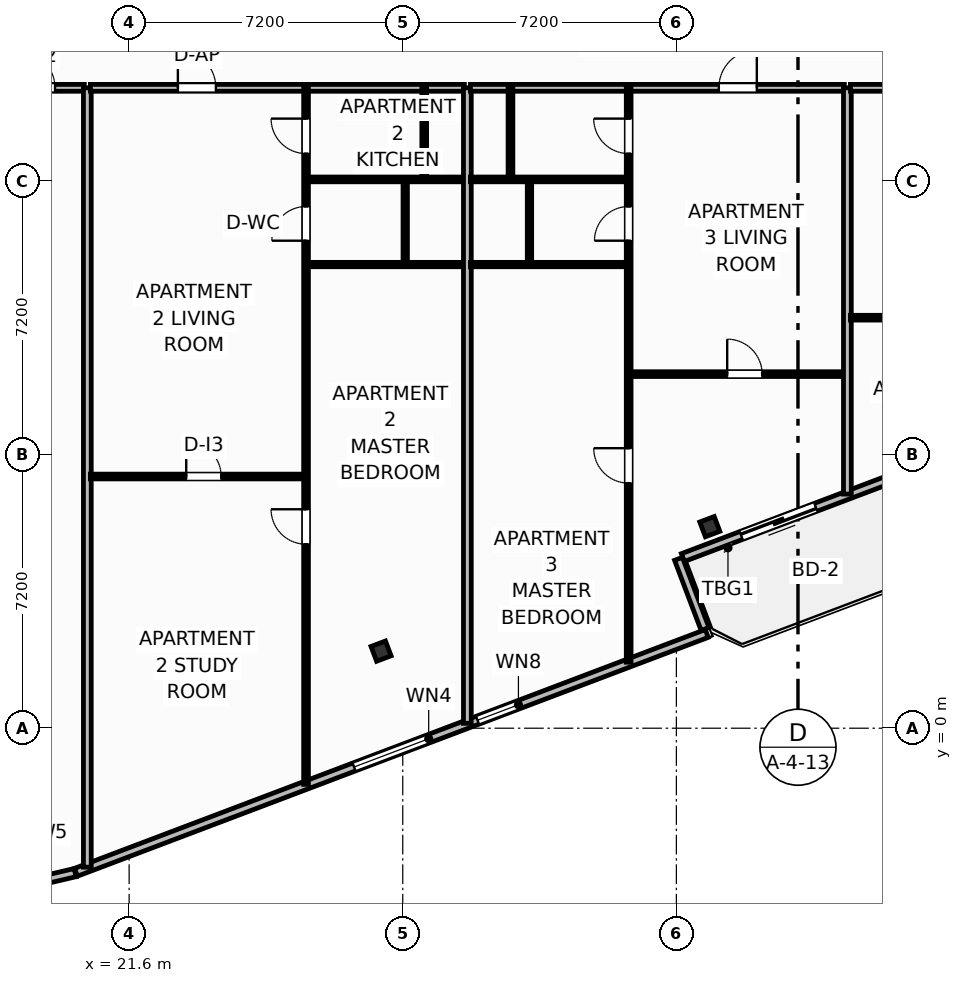
"""IFC4 building model, lengths in metres.
Left out: names, types, materials, properties, quantities, classifications, styles, units other than length and angle.
Written with IfcOpenShell. Run it as: python <this file> out.ifc"""

import sys

from ifc_helpers import new_model, si_unit, direction, frame, frame_2d, origin, origin_2d, place, context, subcontext, project, spatial, rectangle, i_section, extrude, element, fill, save


model = new_model("IFC4")
c1 = context("Model", 3, precision=1e-05, world=origin(), true_north=direction((0.0, 1.0)))
c2 = subcontext(c1, "Body", "Model", "MODEL_VIEW")
j1 = project(units=[si_unit("LENGTHUNIT", "METRE"), si_unit("PLANEANGLEUNIT", "RADIAN")], contexts=[c1])
p1 = place(None, origin())
s1 = spatial("IfcSite", under=j1, at=p1, CompositionType="ELEMENT")
p2 = place(p1, origin())
s2 = spatial("IfcBuilding", under=s1, at=p2, CompositionType="ELEMENT")
p3 = place(p2, frame((0.0, 0.0, 212.7)))
s3 = spatial("IfcBuildingStorey", under=s2, at=p3, CompositionType="ELEMENT", Elevation=212.7)
for number, where, z_axis, x_axis in (
    (1, (28.229, 2.028, 0.0), (0.0, 0.0, 1.0), (0.935, 0.354, 0.0)),
    (2, (36.88, 5.303, 0.0), (0.0, 0.0, 1.0), (0.935, 0.354, 0.0)),
):
    element("IfcColumn", number, at=place(p3, frame(where, z_axis=z_axis, x_axis=x_axis)), inside=s3, PredefinedType="COLUMN", context=c2, shape_type="SweptSolid", body=[
        extrude(i_section(OverallWidth=0.406, OverallDepth=0.416, WebThickness=0.03, FlangeThickness=0.048, FilletRadius=0.025, at=origin_2d()), origin(), (0.0, 0.0, 1.0), 3.7),
    ])
p4 = place(p3, frame((41.783, 6.614, 0.0), z_axis=(0.0, 0.0, 1.0), x_axis=(-0.93521416643, -0.354082565101, 0.0)))
e3 = element("IfcWall", 3, at=p4, inside=s3, PredefinedType="SOLIDWALL", context=c2, shape_type="SweptSolid", body=[
    extrude(rectangle(XDim=6.0, YDim=0.22, at=frame_2d((3.0, 0.0))), origin(), (0.0, 0.0, 1.0), 2.73),
])
p5 = place(p4, frame((2.26, 0.0, 0.0)))
e4 = element("IfcOpeningElement", 4, at=p5, cuts=e3, PredefinedType="OPENING", context=c2, shape_type="SweptSolid", body=[
    extrude(rectangle(XDim=2.1, YDim=2.3, at=frame_2d((1.05, 1.15))), frame((0.0, 0.12, 0.0), z_axis=(0.0, -1.0, 0.0), x_axis=(1.0, 0.0, 0.0)), (0.0, 0.0, 1.0), 0.24),
])
p6 = place(p3, frame((18.956, -4.087, 0.0), z_axis=(0.0, 0.0, 1.0), x_axis=(0.973463008152, 0.228844426981, 0.0)))
e5 = element("IfcWall", 5, at=p6, inside=s3, PredefinedType="SOLIDWALL", context=c2, shape_type="SweptSolid", body=[
    extrude(rectangle(XDim=1.257, YDim=0.22, at=frame_2d((0.628, 0.0))), origin(), (0.0, 0.0, 1.0), 2.73),
])
p7 = place(p3, frame((20.202, -3.791, 0.0), z_axis=(0.0, 0.0, 1.0), x_axis=(0.935225574232, 0.354052432984, 0.0)))
e6 = element("IfcWall", 6, at=p7, inside=s3, PredefinedType="SOLIDWALL", context=c2, shape_type="SweptSolid", body=[
    extrude(rectangle(XDim=17.747, YDim=0.22, at=frame_2d((8.874, 0.0))), origin(), (0.0, 0.0, 1.0), 2.73),
])
p8 = place(p7, frame((7.823, 0.0, 0.8)))
e7 = element("IfcOpeningElement", 7, at=p8, cuts=e6, PredefinedType="OPENING", context=c2, shape_type="SweptSolid", body=[
    extrude(rectangle(XDim=2.1, YDim=1.75, at=frame_2d((1.05, 0.875))), frame((0.0, 0.12, 0.0), z_axis=(0.0, -1.0, 0.0), x_axis=(1.0, 0.0, 0.0)), (0.0, 0.0, 1.0), 0.24),
])
p9 = place(p7, frame((11.298, 0.0, 0.8)))
e8 = element("IfcOpeningElement", 8, at=p9, cuts=e6, PredefinedType="OPENING", context=c2, shape_type="SweptSolid", body=[
    extrude(rectangle(XDim=1.15, YDim=1.4, at=frame_2d((0.575, 0.7))), frame((0.0, 0.12, 0.0), z_axis=(0.0, -1.0, 0.0), x_axis=(1.0, 0.0, 0.0)), (0.0, 0.0, 1.0), 0.24),
])
p10 = place(p3, frame((36.755, 2.61, 0.0), z_axis=(0.0, 0.0, 1.0), x_axis=(-0.354020680661, 0.935237594232, 0.0)))
e9 = element("IfcWall", 9, at=p10, inside=s3, PredefinedType="SOLIDWALL", context=c2, shape_type="SweptSolid", body=[
    extrude(rectangle(XDim=1.975, YDim=0.22, at=frame_2d((0.988, 0.0))), origin(), (0.0, 0.0, 1.0), 2.73),
])
p11 = place(p3, frame((7.196, 16.85, 0.0), z_axis=(0.0, 0.0, 1.0), x_axis=(1.0, 0.0, 0.0)))
e10 = element("IfcWall", 10, at=p11, inside=s3, PredefinedType="PARTITIONING", context=c2, shape_type="SweptSolid", body=[
    extrude(rectangle(XDim=13.224, YDim=0.18, at=frame_2d((6.612, 0.0))), origin(), (0.0, 0.0, 1.0), 3.45),
])
p12 = place(p11, frame((11.504, 0.0, 0.0)))
e11 = element("IfcOpeningElement", 11, at=p12, cuts=e10, PredefinedType="OPENING", context=c2, shape_type="SweptSolid", body=[
    extrude(rectangle(XDim=0.95, YDim=2.05, at=frame_2d((0.475, 1.025))), frame((0.0, 0.1, 0.0), z_axis=(0.0, -1.0, 0.0), x_axis=(1.0, 0.0, 0.0)), (0.0, 0.0, 1.0), 0.2),
])
p13 = place(p3, frame((20.5, -3.657, 0.0), z_axis=(0.0, 0.0, 1.0), x_axis=(0.0, 1.0, 0.0)))
e12 = element("IfcWall", 12, at=p13, inside=s3, PredefinedType="PARTITIONING", context=c2, shape_type="SweptSolid", body=[
    extrude(rectangle(XDim=20.507, YDim=0.205, at=frame_2d((10.253, 0.0))), origin(), (0.0, 0.0, 1.0), 3.45),
])
p14 = place(p3, frame((20.58, 6.623, 0.0), z_axis=(0.0, 0.0, 1.0), x_axis=(1.0, 0.0, 0.0)))
e13 = element("IfcWall", 13, at=p14, inside=s3, PredefinedType="PARTITIONING", context=c2, shape_type="SweptSolid", body=[
    extrude(rectangle(XDim=5.605, YDim=0.125, at=frame_2d((2.803, 0.0))), origin(), (0.0, 0.0, 1.0), 3.45),
])
p15 = place(p14, frame((2.522, 0.0, 0.0)))
e14 = element("IfcOpeningElement", 14, at=p15, cuts=e13, PredefinedType="OPENING", context=c2, shape_type="SweptSolid", body=[
    extrude(rectangle(XDim=0.92, YDim=2.05, at=frame_2d((0.46, 1.025))), frame((0.0, 0.073, 0.0), z_axis=(0.0, -1.0, 0.0), x_axis=(1.0, 0.0, 0.0)), (0.0, 0.0, 1.0), 0.145),
])
p16 = place(p3, frame((20.58, 16.85, 0.0), z_axis=(0.0, 0.0, 1.0), x_axis=(1.0, 0.0, 0.0)))
e15 = element("IfcWall", 15, at=p16, inside=s3, PredefinedType="PARTITIONING", context=c2, shape_type="SweptSolid", body=[
    extrude(rectangle(XDim=9.84, YDim=0.18, at=frame_2d((4.92, 0.0))), origin(), (0.0, 0.0, 1.0), 3.45),
])
p17 = place(p16, frame((2.302, 0.0, 0.0)))
e16 = element("IfcOpeningElement", 16, at=p17, cuts=e15, PredefinedType="OPENING", context=c2, shape_type="SweptSolid", body=[
    extrude(rectangle(XDim=1.0, YDim=2.2, at=frame_2d((0.5, 1.1))), frame((0.0, 0.1, 0.0), z_axis=(0.0, -1.0, 0.0), x_axis=(1.0, 0.0, 0.0)), (0.0, 0.0, 1.0), 0.2),
])
p18 = place(p3, frame((26.255, -1.478, 0.0), z_axis=(0.0, 0.0, 1.0), x_axis=(0.0, 1.0, 0.0)))
e17 = element("IfcWall", 17, at=p18, inside=s3, PredefinedType="PARTITIONING", context=c2, shape_type="SweptSolid", body=[
    extrude(rectangle(XDim=18.328, YDim=0.125, at=frame_2d((9.164, 0.0))), origin(), (0.0, 0.0, 1.0), 2.739),
])
p19 = place(p18, frame((6.319, 0.0, 0.0)))
e18 = element("IfcOpeningElement", 18, at=p19, cuts=e17, PredefinedType="OPENING", context=c2, shape_type="SweptSolid", body=[
    extrude(rectangle(XDim=0.92, YDim=2.05, at=frame_2d((0.46, 1.025))), frame((0.0, 0.073, 0.0), z_axis=(0.0, -1.0, 0.0), x_axis=(1.0, 0.0, 0.0)), (0.0, 0.0, 1.0), 0.145),
])
p20 = place(p18, frame((14.305, 0.0, 0.0)))
e19 = element("IfcOpeningElement", 19, at=p20, cuts=e17, PredefinedType="OPENING", context=c2, shape_type="SweptSolid", body=[
    extrude(rectangle(XDim=0.9, YDim=2.05, at=frame_2d((0.45, 1.025))), frame((0.0, 0.073, 0.0), z_axis=(0.0, -1.0, 0.0), x_axis=(1.0, 0.0, 0.0)), (0.0, 0.0, 1.0), 0.145),
])
p21 = place(p18, frame((16.598, 0.0, 0.0)))
e20 = element("IfcOpeningElement", 20, at=p21, cuts=e17, PredefinedType="OPENING", context=c2, shape_type="SweptSolid", body=[
    extrude(rectangle(XDim=0.92, YDim=2.05, at=frame_2d((0.46, 1.025))), frame((0.0, 0.073, 0.0), z_axis=(0.0, -1.0, 0.0), x_axis=(1.0, 0.0, 0.0)), (0.0, 0.0, 1.0), 0.145),
])
p22 = place(p3, frame((26.325, 14.44, 0.0), z_axis=(0.0, 0.0, 1.0), x_axis=(1.0, 0.0, 0.0)))
e21 = element("IfcWall", 21, at=p22, inside=s3, PredefinedType="PARTITIONING", context=c2, shape_type="SweptSolid", body=[
    extrude(rectangle(XDim=4.095, YDim=0.125, at=frame_2d((2.047, 0.0))), origin(), (0.0, 0.0, 1.0), 3.45),
])
p23 = place(p3, frame((26.325, 12.2, 0.0), z_axis=(0.0, 0.0, 1.0), x_axis=(1.0, 0.0, 0.0)))
e22 = element("IfcWall", 22, at=p23, inside=s3, PredefinedType="PARTITIONING", context=c2, shape_type="SweptSolid", body=[
    extrude(rectangle(XDim=4.095, YDim=0.115, at=frame_2d((2.047, 0.0))), origin(), (0.0, 0.0, 1.0), 3.45),
])
p24 = place(p3, frame((29.365, 14.44, 0.0), z_axis=(0.0, 0.0, 1.0), x_axis=(0.0, 1.0, 0.0)))
e23 = element("IfcWall", 23, at=p24, inside=s3, PredefinedType="PARTITIONING", context=c2, shape_type="SweptSolid", body=[
    extrude(rectangle(XDim=2.41, YDim=0.125, at=frame_2d((1.205, 0.0))), origin(), (0.0, 0.0, 1.0), 3.45),
])
p25 = place(p3, frame((28.865, 12.2, 0.0), z_axis=(0.0, 0.0, 1.0), x_axis=(0.0, 1.0, 0.0)))
e24 = element("IfcWall", 24, at=p25, inside=s3, PredefinedType="PARTITIONING", context=c2, shape_type="SweptSolid", body=[
    extrude(rectangle(XDim=2.24, YDim=0.115, at=frame_2d((1.12, 0.0))), origin(), (0.0, 0.0, 1.0), 3.45),
])
p26 = place(p3, frame((30.5, 0.129, 0.0), z_axis=(0.0, 0.0, 1.0), x_axis=(0.0, 1.0, 0.0)))
e25 = element("IfcWall", 25, at=p26, inside=s3, PredefinedType="PARTITIONING", context=c2, shape_type="SweptSolid", body=[
    extrude(rectangle(XDim=16.721, YDim=0.205, at=frame_2d((8.36, 0.0))), origin(), (0.0, 0.0, 1.0), 3.45),
])
p27 = place(p3, frame((34.815, 9.317, 0.0), z_axis=(0.0, 0.0, 1.0), x_axis=(1.0, 0.0, 0.0)))
e26 = element("IfcWall", 26, at=p27, inside=s3, PredefinedType="PARTITIONING", context=c2, shape_type="SweptSolid", body=[
    extrude(rectangle(XDim=5.605, YDim=0.125, at=frame_2d((2.803, 0.0))), origin(), (0.0, 0.0, 1.0), 3.45),
])
p28 = place(p27, frame((2.522, 0.0, 0.0)))
e27 = element("IfcOpeningElement", 27, at=p28, cuts=e26, PredefinedType="OPENING", context=c2, shape_type="SweptSolid", body=[
    extrude(rectangle(XDim=0.92, YDim=2.05, at=frame_2d((0.46, 1.025))), frame((0.0, 0.073, 0.0), z_axis=(0.0, -1.0, 0.0), x_axis=(1.0, 0.0, 0.0)), (0.0, 0.0, 1.0), 0.145),
])
p29 = place(p3, frame((30.58, 16.85, 0.0), z_axis=(0.0, 0.0, 1.0), x_axis=(1.0, 0.0, 0.0)))
e28 = element("IfcWall", 28, at=p29, inside=s3, PredefinedType="PARTITIONING", context=c2, shape_type="SweptSolid", body=[
    extrude(rectangle(XDim=9.84, YDim=0.18, at=frame_2d((4.92, 0.0))), origin(), (0.0, 0.0, 1.0), 3.45),
])
p30 = place(p29, frame((6.537, 0.0, 0.0)))
e29 = element("IfcOpeningElement", 29, at=p30, cuts=e28, PredefinedType="OPENING", context=c2, shape_type="SweptSolid", body=[
    extrude(rectangle(XDim=1.0, YDim=2.2, at=frame_2d((0.5, 1.1))), frame((0.0, 0.1, 0.0), z_axis=(0.0, -1.0, 0.0), x_axis=(1.0, 0.0, 0.0)), (0.0, 0.0, 1.0), 0.2),
])
p31 = place(p3, frame((34.745, 1.736, 0.0), z_axis=(0.0, 0.0, 1.0), x_axis=(0.0, 1.0, 0.0)))
e30 = element("IfcWall", 30, at=p31, inside=s3, PredefinedType="PARTITIONING", context=c2, shape_type="SweptSolid", body=[
    extrude(rectangle(XDim=15.114, YDim=0.125, at=frame_2d((7.557, 0.0))), origin(), (0.0, 0.0, 1.0), 2.739),
])
p32 = place(p31, frame((4.712, 0.0, 0.0)))
e31 = element("IfcOpeningElement", 31, at=p32, cuts=e30, PredefinedType="OPENING", context=c2, shape_type="SweptSolid", body=[
    extrude(rectangle(XDim=0.92, YDim=2.05, at=frame_2d((0.46, 1.025))), frame((0.0, 0.073, 0.0), z_axis=(0.0, -1.0, 0.0), x_axis=(1.0, 0.0, 0.0)), (0.0, 0.0, 1.0), 0.145),
])
p33 = place(p31, frame((11.091, 0.0, 0.0)))
e32 = element("IfcOpeningElement", 32, at=p33, cuts=e30, PredefinedType="OPENING", context=c2, shape_type="SweptSolid", body=[
    extrude(rectangle(XDim=0.9, YDim=2.05, at=frame_2d((0.45, 1.025))), frame((0.0, 0.073, 0.0), z_axis=(0.0, -1.0, 0.0), x_axis=(1.0, 0.0, 0.0)), (0.0, 0.0, 1.0), 0.145),
])
p34 = place(p31, frame((13.384, 0.0, 0.0)))
e33 = element("IfcOpeningElement", 33, at=p34, cuts=e30, PredefinedType="OPENING", context=c2, shape_type="SweptSolid", body=[
    extrude(rectangle(XDim=0.92, YDim=2.05, at=frame_2d((0.46, 1.025))), frame((0.0, 0.073, 0.0), z_axis=(0.0, -1.0, 0.0), x_axis=(1.0, 0.0, 0.0)), (0.0, 0.0, 1.0), 0.145),
])
p35 = place(p3, frame((30.58, 14.44, 0.0), z_axis=(0.0, 0.0, 1.0), x_axis=(1.0, 0.0, 0.0)))
e34 = element("IfcWall", 34, at=p35, inside=s3, PredefinedType="PARTITIONING", context=c2, shape_type="SweptSolid", body=[
    extrude(rectangle(XDim=4.095, YDim=0.125, at=frame_2d((2.047, 0.0))), origin(), (0.0, 0.0, 1.0), 3.45),
])
p36 = place(p3, frame((30.58, 12.2, 0.0), z_axis=(0.0, 0.0, 1.0), x_axis=(1.0, 0.0, 0.0)))
e35 = element("IfcWall", 35, at=p36, inside=s3, PredefinedType="PARTITIONING", context=c2, shape_type="SweptSolid", body=[
    extrude(rectangle(XDim=4.095, YDim=0.115, at=frame_2d((2.047, 0.0))), origin(), (0.0, 0.0, 1.0), 3.45),
])
p37 = place(p3, frame((31.635, 14.44, 0.0), z_axis=(0.0, 0.0, 1.0), x_axis=(0.0, 1.0, 0.0)))
e36 = element("IfcWall", 36, at=p37, inside=s3, PredefinedType="PARTITIONING", context=c2, shape_type="SweptSolid", body=[
    extrude(rectangle(XDim=2.41, YDim=0.125, at=frame_2d((1.205, 0.0))), origin(), (0.0, 0.0, 1.0), 3.45),
])
p38 = place(p3, frame((32.135, 12.2, 0.0), z_axis=(0.0, 0.0, 1.0), x_axis=(0.0, 1.0, 0.0)))
e37 = element("IfcWall", 37, at=p38, inside=s3, PredefinedType="PARTITIONING", context=c2, shape_type="SweptSolid", body=[
    extrude(rectangle(XDim=2.24, YDim=0.115, at=frame_2d((1.12, 0.0))), origin(), (0.0, 0.0, 1.0), 3.45),
])
p39 = place(p3, frame((40.5, 6.16, 0.0), z_axis=(0.0, 0.0, 1.0), x_axis=(0.0, 1.0, 0.0)))
e38 = element("IfcWall", 38, at=p39, inside=s3, PredefinedType="PARTITIONING", context=c2, shape_type="SweptSolid", body=[
    extrude(rectangle(XDim=10.69, YDim=0.205, at=frame_2d((5.345, 0.0))), origin(), (0.0, 0.0, 1.0), 3.45),
])
p40 = place(p3, frame((40.58, 10.802, 0.0), z_axis=(0.0, 0.0, 1.0), x_axis=(1.0, 0.0, 0.0)))
e39 = element("IfcWall", 39, at=p40, inside=s3, PredefinedType="PARTITIONING", context=c2, shape_type="SweptSolid", body=[
    extrude(rectangle(XDim=5.605, YDim=0.125, at=frame_2d((2.803, 0.0))), origin(), (0.0, 0.0, 1.0), 3.45),
])
p41 = place(p40, frame((2.522, 0.0, 0.0)))
e40 = element("IfcOpeningElement", 40, at=p41, cuts=e39, PredefinedType="OPENING", context=c2, shape_type="SweptSolid", body=[
    extrude(rectangle(XDim=0.92, YDim=2.05, at=frame_2d((0.46, 1.025))), frame((0.0, 0.073, 0.0), z_axis=(0.0, -1.0, 0.0), x_axis=(1.0, 0.0, 0.0)), (0.0, 0.0, 1.0), 0.145),
])
p42 = place(p3, frame((40.58, 16.85, 0.0), z_axis=(0.0, 0.0, 1.0), x_axis=(1.0, 0.0, 0.0)))
e41 = element("IfcWall", 41, at=p42, inside=s3, PredefinedType="PARTITIONING", context=c2, shape_type="SweptSolid", body=[
    extrude(rectangle(XDim=9.84, YDim=0.18, at=frame_2d((4.92, 0.0))), origin(), (0.0, 0.0, 1.0), 3.45),
])
p43 = place(p42, frame((2.302, 0.0, 0.0)))
e42 = element("IfcOpeningElement", 42, at=p43, cuts=e41, PredefinedType="OPENING", context=c2, shape_type="SweptSolid", body=[
    extrude(rectangle(XDim=1.0, YDim=2.2, at=frame_2d((0.5, 1.1))), frame((0.0, 0.1, 0.0), z_axis=(0.0, -1.0, 0.0), x_axis=(1.0, 0.0, 0.0)), (0.0, 0.0, 1.0), 0.2),
])
p44 = place(p5, origin())
e43 = element("IfcDoor", 43, at=p44, inside=s3, OperationType="SLIDING_TO_LEFT", PredefinedType="DOOR", context=c2, shape_type="SweptSolid", body=[
    extrude(rectangle(XDim=2.1, YDim=2.3, at=frame_2d((1.05, 1.15))), frame((0.0, 0.025, 0.0), z_axis=(0.0, -1.0, 0.0), x_axis=(1.0, 0.0, 0.0)), (0.0, 0.0, 1.0), 0.05),
])
fill(e4, e43)
p45 = place(p8, origin())
e44 = element("IfcWindow", 44, at=p45, inside=s3, PartitioningType="SINGLE_PANEL", PredefinedType="WINDOW", context=c2, shape_type="SweptSolid", body=[
    extrude(rectangle(XDim=2.1, YDim=1.75, at=frame_2d((1.05, 0.875))), frame((0.0, 0.03, 0.0), z_axis=(0.0, -1.0, 0.0), x_axis=(1.0, 0.0, 0.0)), (0.0, 0.0, 1.0), 0.06),
])
fill(e7, e44)
p46 = place(p12, origin())
e45 = element("IfcDoor", 45, at=p46, inside=s3, OperationType="SINGLE_SWING_LEFT", PredefinedType="DOOR", context=c2, shape_type="SweptSolid", body=[
    extrude(rectangle(XDim=0.95, YDim=2.05, at=frame_2d((0.475, 1.025))), frame((0.0, 0.025, 0.0), z_axis=(0.0, -1.0, 0.0), x_axis=(1.0, 0.0, 0.0)), (0.0, 0.0, 1.0), 0.05),
])
fill(e11, e45)
p47 = place(p15, origin())
e46 = element("IfcDoor", 46, at=p47, inside=s3, OperationType="SINGLE_SWING_LEFT", PredefinedType="DOOR", context=c2, shape_type="SweptSolid", body=[
    extrude(rectangle(XDim=0.92, YDim=2.05, at=frame_2d((0.46, 1.025))), frame((0.0, 0.025, 0.0), z_axis=(0.0, -1.0, 0.0), x_axis=(1.0, 0.0, 0.0)), (0.0, 0.0, 1.0), 0.05),
])
fill(e14, e46)
p48 = place(p17, origin())
e47 = element("IfcDoor", 47, at=p48, inside=s3, OperationType="SINGLE_SWING_LEFT", PredefinedType="DOOR", context=c2, shape_type="SweptSolid", body=[
    extrude(rectangle(XDim=1.0, YDim=2.2, at=frame_2d((0.5, 1.1))), frame((0.0, 0.025, 0.0), z_axis=(0.0, -1.0, 0.0), x_axis=(1.0, 0.0, 0.0)), (0.0, 0.0, 1.0), 0.05),
])
fill(e16, e47)
p49 = place(p19, origin())
e48 = element("IfcDoor", 48, at=p49, inside=s3, OperationType="SINGLE_SWING_RIGHT", PredefinedType="DOOR", context=c2, shape_type="SweptSolid", body=[
    extrude(rectangle(XDim=0.92, YDim=2.05, at=frame_2d((0.46, 1.025))), frame((0.0, 0.025, 0.0), z_axis=(0.0, -1.0, 0.0), x_axis=(1.0, 0.0, 0.0)), (0.0, 0.0, 1.0), 0.05),
])
fill(e18, e48)
p50 = place(p20, origin())
e49 = element("IfcDoor", 49, at=p50, inside=s3, OperationType="SINGLE_SWING_LEFT", PredefinedType="DOOR", context=c2, shape_type="SweptSolid", body=[
    extrude(rectangle(XDim=0.9, YDim=2.05, at=frame_2d((0.45, 1.025))), frame((0.0, 0.025, 0.0), z_axis=(0.0, -1.0, 0.0), x_axis=(1.0, 0.0, 0.0)), (0.0, 0.0, 1.0), 0.05),
])
fill(e19, e49)
p51 = place(p21, origin())
e50 = element("IfcDoor", 50, at=p51, inside=s3, OperationType="SINGLE_SWING_RIGHT", PredefinedType="DOOR", context=c2, shape_type="SweptSolid", body=[
    extrude(rectangle(XDim=0.92, YDim=2.05, at=frame_2d((0.46, 1.025))), frame((0.0, 0.025, 0.0), z_axis=(0.0, -1.0, 0.0), x_axis=(1.0, 0.0, 0.0)), (0.0, 0.0, 1.0), 0.05),
])
fill(e20, e50)
p52 = place(p28, origin())
e51 = element("IfcDoor", 51, at=p52, inside=s3, OperationType="SINGLE_SWING_LEFT", PredefinedType="DOOR", context=c2, shape_type="SweptSolid", body=[
    extrude(rectangle(XDim=0.92, YDim=2.05, at=frame_2d((0.46, 1.025))), frame((0.0, 0.025, 0.0), z_axis=(0.0, -1.0, 0.0), x_axis=(1.0, 0.0, 0.0)), (0.0, 0.0, 1.0), 0.05),
])
fill(e27, e51)
p53 = place(p30, origin())
e52 = element("IfcDoor", 52, at=p53, inside=s3, OperationType="SINGLE_SWING_RIGHT", PredefinedType="DOOR", context=c2, shape_type="SweptSolid", body=[
    extrude(rectangle(XDim=1.0, YDim=2.2, at=frame_2d((0.5, 1.1))), frame((0.0, 0.025, 0.0), z_axis=(0.0, -1.0, 0.0), x_axis=(1.0, 0.0, 0.0)), (0.0, 0.0, 1.0), 0.05),
])
fill(e29, e52)
p54 = place(p32, origin())
e53 = element("IfcDoor", 53, at=p54, inside=s3, OperationType="SINGLE_SWING_RIGHT", PredefinedType="DOOR", context=c2, shape_type="SweptSolid", body=[
    extrude(rectangle(XDim=0.92, YDim=2.05, at=frame_2d((0.46, 1.025))), frame((0.0, 0.025, 0.0), z_axis=(0.0, -1.0, 0.0), x_axis=(1.0, 0.0, 0.0)), (0.0, 0.0, 1.0), 0.05),
])
fill(e31, e53)
p55 = place(p33, origin())
e54 = element("IfcDoor", 54, at=p55, inside=s3, OperationType="SINGLE_SWING_LEFT", PredefinedType="DOOR", context=c2, shape_type="SweptSolid", body=[
    extrude(rectangle(XDim=0.9, YDim=2.05, at=frame_2d((0.45, 1.025))), frame((0.0, 0.025, 0.0), z_axis=(0.0, -1.0, 0.0), x_axis=(1.0, 0.0, 0.0)), (0.0, 0.0, 1.0), 0.05),
])
fill(e32, e54)
p56 = place(p34, origin())
e55 = element("IfcDoor", 55, at=p56, inside=s3, OperationType="SINGLE_SWING_RIGHT", PredefinedType="DOOR", context=c2, shape_type="SweptSolid", body=[
    extrude(rectangle(XDim=0.92, YDim=2.05, at=frame_2d((0.46, 1.025))), frame((0.0, 0.025, 0.0), z_axis=(0.0, -1.0, 0.0), x_axis=(1.0, 0.0, 0.0)), (0.0, 0.0, 1.0), 0.05),
])
fill(e33, e55)
p57 = place(p9, origin())
e56 = element("IfcWindow", 56, at=p57, inside=s3, PartitioningType="SINGLE_PANEL", PredefinedType="WINDOW", context=c2, shape_type="SweptSolid", body=[
    extrude(rectangle(XDim=1.15, YDim=1.4, at=frame_2d((0.575, 0.7))), frame((0.0, 0.03, 0.0), z_axis=(0.0, -1.0, 0.0), x_axis=(1.0, 0.0, 0.0)), (0.0, 0.0, 1.0), 0.06),
])
fill(e8, e56)
save(model, sys.argv[1])
